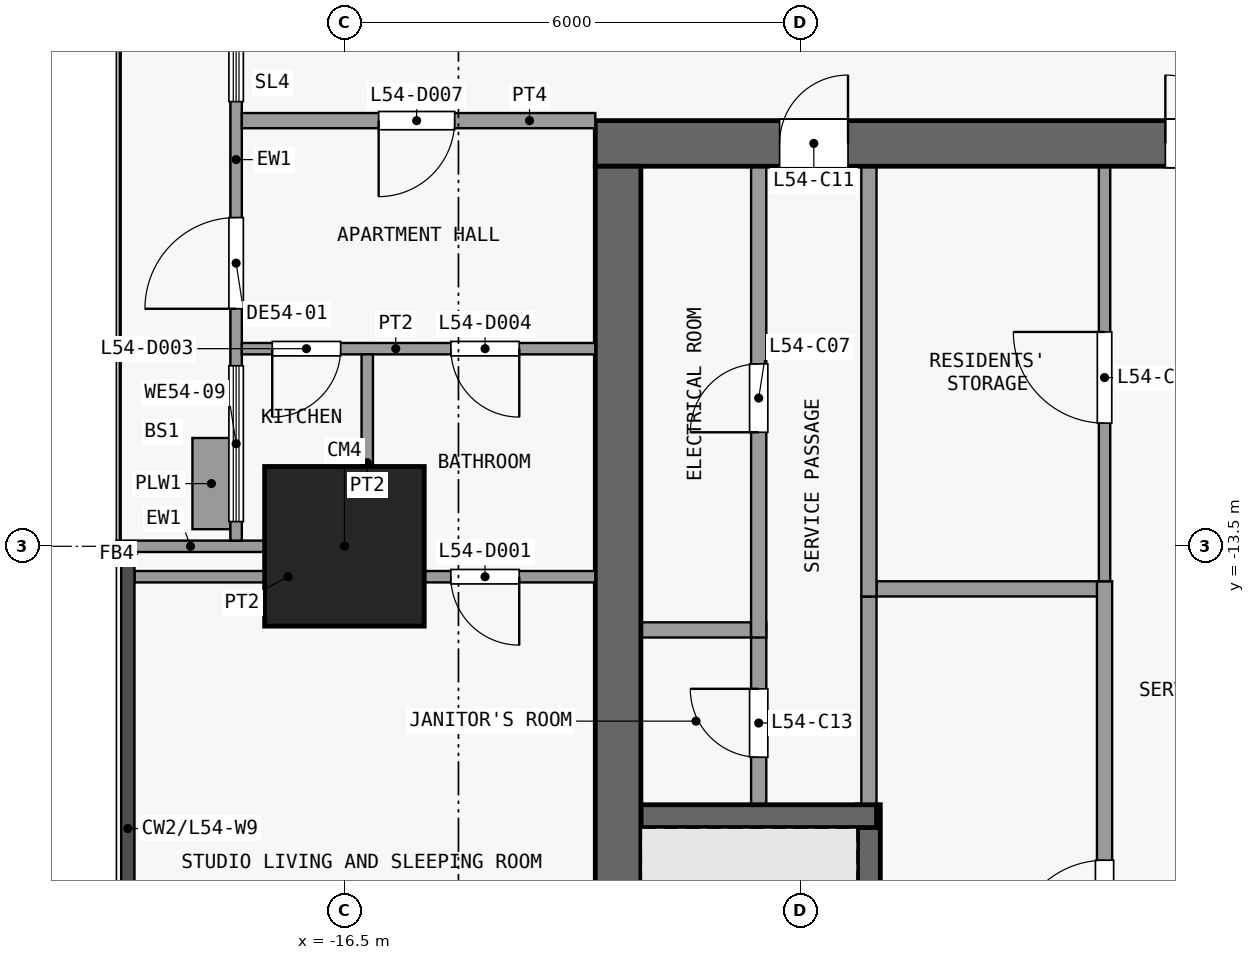
"""IFC4 building model, lengths in metres.
Left out: names, types, materials, properties, quantities, classifications, styles, units other than length and angle.
Written with IfcOpenShell. Run it as: python <this file> out.ifc"""

import sys

from ifc_helpers import new_model, si_unit, direction, frame, frame_2d, origin, origin_2d, place, context, subcontext, project, spatial, rectangle, extrude, element, fill, save


model = new_model("IFC4")
c1 = context("Model", 3, precision=1e-05, world=origin(), true_north=direction((0.0, 1.0)))
c2 = subcontext(c1, "Body", "Model", "MODEL_VIEW")
j1 = project(units=[si_unit("LENGTHUNIT", "METRE"), si_unit("PLANEANGLEUNIT", "RADIAN")], contexts=[c1])
p1 = place(None, origin())
s1 = spatial("IfcSite", under=j1, at=p1, CompositionType="ELEMENT")
p2 = place(p1, origin())
s2 = spatial("IfcBuilding", under=s1, at=p2, CompositionType="ELEMENT")
p3 = place(p2, frame((0.0, 0.0, 215.9)))
s3 = spatial("IfcBuildingStorey", under=s2, at=p3, CompositionType="ELEMENT", Elevation=215.9)
p4 = place(p3, frame((-16.5, -13.5, 0.0), z_axis=(0.0, 0.0, 1.0), x_axis=(1.0, 0.0, 0.0)))
e1 = element("IfcColumn", 1, at=p4, inside=s3, PredefinedType="COLUMN", context=c2, shape_type="SweptSolid", body=[
    extrude(rectangle(XDim=2.1, YDim=2.1, at=origin_2d()), origin(), (0.0, 0.0, 1.0), 3.6),
])
p5 = place(p3, frame((-13.2, -8.2, 0.0), z_axis=(0.0, 0.0, 1.0), x_axis=(1.0, 0.0, 0.0)))
e2 = element("IfcWall", 2, at=p5, inside=s3, PredefinedType="SHEAR", context=c2, shape_type="SweptSolid", body=[
    extrude(rectangle(XDim=26.4, YDim=0.6, at=frame_2d((13.2, 0.0))), origin(), (0.0, 0.0, 1.0), 3.3),
])
p6 = place(p5, frame((7.5, 0.0, 0.0)))
e3 = element("IfcOpeningElement", 3, at=p6, cuts=e2, PredefinedType="OPENING", context=c2, shape_type="SweptSolid", body=[
    extrude(rectangle(XDim=1.8, YDim=2.1, at=frame_2d((0.9, 1.05))), frame((0.0, 0.31, 0.0), z_axis=(0.0, -1.0, 0.0), x_axis=(1.0, 0.0, 0.0)), (0.0, 0.0, 1.0), 0.62),
])
p7 = place(p5, frame((17.1, 0.0, 0.0)))
e4 = element("IfcOpeningElement", 4, at=p7, cuts=e2, PredefinedType="OPENING", context=c2, shape_type="SweptSolid", body=[
    extrude(rectangle(XDim=1.8, YDim=2.1, at=frame_2d((0.9, 1.05))), frame((0.0, 0.31, 0.0), z_axis=(0.0, -1.0, 0.0), x_axis=(1.0, 0.0, 0.0)), (0.0, 0.0, 1.0), 0.62),
])
p8 = place(p5, frame((2.425, 0.0, 0.0)))
e5 = element("IfcOpeningElement", 5, at=p8, cuts=e2, PredefinedType="OPENING", context=c2, shape_type="SweptSolid", body=[
    extrude(rectangle(XDim=0.9, YDim=2.1, at=frame_2d((0.45, 1.05))), frame((0.0, 0.31, 0.0), z_axis=(0.0, -1.0, 0.0), x_axis=(1.0, 0.0, 0.0)), (0.0, 0.0, 1.0), 0.62),
])
p9 = place(p5, frame((23.075, 0.0, 0.0)))
e6 = element("IfcOpeningElement", 6, at=p9, cuts=e2, PredefinedType="OPENING", context=c2, shape_type="SweptSolid", body=[
    extrude(rectangle(XDim=0.9, YDim=2.1, at=frame_2d((0.45, 1.05))), frame((0.0, 0.31, 0.0), z_axis=(0.0, -1.0, 0.0), x_axis=(1.0, 0.0, 0.0)), (0.0, 0.0, 1.0), 0.62),
])
p10 = place(p3, frame((-12.9, -24.6, 0.0), z_axis=(0.0, 0.0, 1.0), x_axis=(0.0, 1.0, 0.0)))
e7 = element("IfcWall", 7, at=p10, inside=s3, PredefinedType="SHEAR", context=c2, shape_type="SweptSolid", body=[
    extrude(rectangle(XDim=16.1, YDim=0.6, at=frame_2d((8.05, 0.0))), origin(), (0.0, 0.0, 1.0), 3.3),
])
p11 = place(p3, frame((-12.6, -17.05, 0.0), z_axis=(0.0, 0.0, 1.0), x_axis=(1.0, 0.0, 0.0)))
e8 = element("IfcWall", 8, at=p11, inside=s3, PredefinedType="SHEAR", context=c2, shape_type="SweptSolid", body=[
    extrude(rectangle(XDim=3.1, YDim=0.3, at=frame_2d((1.55, 0.0))), origin(), (0.0, 0.0, 1.0), 3.3),
])
p12 = place(p3, frame((-12.6, -14.6, 0.0), z_axis=(0.0, 0.0, 1.0), x_axis=(1.0, 0.0, 0.0)))
e9 = element("IfcWall", 9, at=p12, inside=s3, PredefinedType="PARTITIONING", context=c2, shape_type="SweptSolid", body=[
    extrude(rectangle(XDim=1.45, YDim=0.2, at=frame_2d((0.725, 0.0))), origin(), (0.0, 0.0, 1.0), 3.3),
])
p13 = place(p3, frame((-9.5, -14.06, 0.0), z_axis=(0.0, 0.0, 1.0), x_axis=(1.0, 0.0, 0.0)))
e10 = element("IfcWall", 10, at=p13, inside=s3, PredefinedType="PARTITIONING", context=c2, shape_type="SweptSolid", body=[
    extrude(rectangle(XDim=3.075, YDim=0.2, at=frame_2d((1.538, 0.0))), origin(), (0.0, 0.0, 1.0), 3.3),
])
p14 = place(p3, frame((-11.05, -16.9, 0.0), z_axis=(0.0, 0.0, 1.0), x_axis=(0.0, 1.0, 0.0)))
e11 = element("IfcWall", 11, at=p14, inside=s3, PredefinedType="PARTITIONING", context=c2, shape_type="SweptSolid", body=[
    extrude(rectangle(XDim=2.4, YDim=0.2, at=frame_2d((1.2, 0.0))), origin(), (0.0, 0.0, 1.0), 3.3),
])
p15 = place(p14, frame((0.625, 0.0, 0.0)))
e12 = element("IfcOpeningElement", 12, at=p15, cuts=e11, PredefinedType="OPENING", context=c2, shape_type="SweptSolid", body=[
    extrude(rectangle(XDim=0.9, YDim=2.1, at=frame_2d((0.45, 1.05))), frame((0.0, 0.11, 0.0), z_axis=(0.0, -1.0, 0.0), x_axis=(1.0, 0.0, 0.0)), (0.0, 0.0, 1.0), 0.22),
])
p16 = place(p3, frame((-11.05, -14.7, 0.0), z_axis=(0.0, 0.0, 1.0), x_axis=(0.0, 1.0, 0.0)))
e13 = element("IfcWall", 13, at=p16, inside=s3, PredefinedType="PARTITIONING", context=c2, shape_type="SweptSolid", body=[
    extrude(rectangle(XDim=6.2, YDim=0.2, at=frame_2d((3.1, 0.0))), origin(), (0.0, 0.0, 1.0), 3.3),
])
p17 = place(p16, frame((2.7, 0.0, 0.0)))
e14 = element("IfcOpeningElement", 14, at=p17, cuts=e13, PredefinedType="OPENING", context=c2, shape_type="SweptSolid", body=[
    extrude(rectangle(XDim=0.9, YDim=2.1, at=frame_2d((0.45, 1.05))), frame((0.0, 0.11, 0.0), z_axis=(0.0, -1.0, 0.0), x_axis=(1.0, 0.0, 0.0)), (0.0, 0.0, 1.0), 0.22),
])
p18 = place(p3, frame((-9.6, -24.6, 0.0), z_axis=(0.0, 0.0, 1.0), x_axis=(0.0, 1.0, 0.0)))
e15 = element("IfcWall", 15, at=p18, inside=s3, PredefinedType="SHEAR", context=c2, shape_type="SweptSolid", body=[
    extrude(rectangle(XDim=7.7, YDim=0.3, at=frame_2d((3.85, 0.0))), origin(), (0.0, 0.0, 1.0), 3.3),
])
p19 = place(p18, frame((0.1, 0.0, 0.0)))
e16 = element("IfcOpeningElement", 16, at=p19, cuts=e15, PredefinedType="OPENING", context=c2, shape_type="SweptSolid", body=[
    extrude(rectangle(XDim=1.1, YDim=2.1, at=frame_2d((0.55, 1.05))), frame((0.0, 0.16, 0.0), z_axis=(0.0, -1.0, 0.0), x_axis=(1.0, 0.0, 0.0)), (0.0, 0.0, 1.0), 0.32),
])
p20 = place(p3, frame((-9.6, -16.9, 0.0), z_axis=(0.0, 0.0, 1.0), x_axis=(0.0, 1.0, 0.0)))
e17 = element("IfcWall", 17, at=p20, inside=s3, PredefinedType="PARTITIONING", context=c2, shape_type="SweptSolid", body=[
    extrude(rectangle(XDim=2.74, YDim=0.2, at=frame_2d((1.37, 0.0))), origin(), (0.0, 0.0, 1.0), 3.3),
])
p21 = place(p3, frame((-9.6, -14.16, 0.0), z_axis=(0.0, 0.0, 1.0), x_axis=(0.0, 1.0, 0.0)))
e18 = element("IfcWall", 18, at=p21, inside=s3, PredefinedType="PARTITIONING", context=c2, shape_type="SweptSolid", body=[
    extrude(rectangle(XDim=5.66, YDim=0.2, at=frame_2d((2.83, 0.0))), origin(), (0.0, 0.0, 1.0), 3.3),
])
p22 = place(p3, frame((-6.5, -22.5, 0.0), z_axis=(0.0, 0.0, 1.0), x_axis=(0.0, 1.0, 0.0)))
e19 = element("IfcWall", 19, at=p22, inside=s3, PredefinedType="PARTITIONING", context=c2, shape_type="SweptSolid", body=[
    extrude(rectangle(XDim=8.54, YDim=0.2, at=frame_2d((4.27, 0.0))), origin(), (0.0, 0.0, 1.0), 3.3),
])
p23 = place(p22, frame((3.67, 0.0, 0.0)))
e20 = element("IfcOpeningElement", 20, at=p23, cuts=e19, PredefinedType="OPENING", context=c2, shape_type="SweptSolid", body=[
    extrude(rectangle(XDim=1.2, YDim=2.1, at=frame_2d((0.6, 1.05))), frame((0.0, 0.11, 0.0), z_axis=(0.0, -1.0, 0.0), x_axis=(1.0, 0.0, 0.0)), (0.0, 0.0, 1.0), 0.22),
])
p24 = place(p3, frame((-6.5, -13.96, 0.0), z_axis=(0.0, 0.0, 1.0), x_axis=(0.0, 1.0, 0.0)))
e21 = element("IfcWall", 21, at=p24, inside=s3, PredefinedType="PARTITIONING", context=c2, shape_type="SweptSolid", body=[
    extrude(rectangle(XDim=5.46, YDim=0.15, at=frame_2d((2.73, 0.0))), origin(), (0.0, 0.0, 1.0), 3.3),
])
p25 = place(p24, frame((2.08, 0.0, 0.0)))
e22 = element("IfcOpeningElement", 22, at=p25, cuts=e21, PredefinedType="OPENING", context=c2, shape_type="SweptSolid", body=[
    extrude(rectangle(XDim=1.2, YDim=2.1, at=frame_2d((0.6, 1.05))), frame((0.0, 0.085, 0.0), z_axis=(0.0, -1.0, 0.0), x_axis=(1.0, 0.0, 0.0)), (0.0, 0.0, 1.0), 0.17),
])
p26 = place(p3, frame((-17.55, -13.5, 0.0), z_axis=(0.0, 0.0, 1.0), x_axis=(-1.0, 0.0, 0.0)))
e23 = element("IfcWall", 23, at=p26, inside=s3, PredefinedType="SOLIDWALL", context=c2, shape_type="SweptSolid", body=[
    extrude(rectangle(XDim=1.95, YDim=0.15, at=frame_2d((0.975, 0.0))), origin(), (0.0, 0.0, 1.0), 3.3),
])
p27 = place(p3, frame((-17.925, -13.425, 0.0), z_axis=(0.0, 0.0, 1.0), x_axis=(0.0, 1.0, 0.0)))
e24 = element("IfcWall", 24, at=p27, inside=s3, PredefinedType="SOLIDWALL", context=c2, shape_type="SweptSolid", body=[
    extrude(rectangle(XDim=8.85, YDim=0.15, at=frame_2d((4.425, 0.0))), origin(), (0.0, 0.0, 1.0), 3.3),
])
p28 = place(p27, frame((3.05, 0.0, 0.0)))
e25 = element("IfcOpeningElement", 25, at=p28, cuts=e24, PredefinedType="OPENING", context=c2, shape_type="SweptSolid", body=[
    extrude(rectangle(XDim=1.2, YDim=2.4, at=frame_2d((0.6, 1.2))), frame((0.0, 0.085, 0.0), z_axis=(0.0, -1.0, 0.0), x_axis=(1.0, 0.0, 0.0)), (0.0, 0.0, 1.0), 0.17),
])
p29 = place(p27, frame((0.25, 0.0, 0.9)))
e26 = element("IfcOpeningElement", 26, at=p29, cuts=e24, PredefinedType="OPENING", context=c2, shape_type="SweptSolid", body=[
    extrude(rectangle(XDim=2.05, YDim=2.1, at=frame_2d((1.025, 1.05))), frame((0.0, 0.085, 0.0), z_axis=(0.0, -1.0, 0.0), x_axis=(1.0, 0.0, 0.0)), (0.0, 0.0, 1.0), 0.17),
])
p30 = place(p27, frame((5.775, 0.0, 0.9)))
e27 = element("IfcOpeningElement", 27, at=p30, cuts=e24, PredefinedType="OPENING", context=c2, shape_type="SweptSolid", body=[
    extrude(rectangle(XDim=2.275, YDim=2.1, at=frame_2d((1.137, 1.05))), frame((0.0, 0.085, 0.0), z_axis=(0.0, -1.0, 0.0), x_axis=(1.0, 0.0, 0.0)), (0.0, 0.0, 1.0), 0.17),
])
p31 = place(p3, frame((-18.25, -13.275, 0.0), z_axis=(0.0, 0.0, 1.0), x_axis=(0.0, 1.0, 0.0)))
e28 = element("IfcWall", 28, at=p31, inside=s3, PredefinedType="USERDEFINED", context=c2, shape_type="SweptSolid", body=[
    extrude(rectangle(XDim=1.2, YDim=0.5, at=frame_2d((0.6, 0.0))), origin(), (0.0, 0.0, 1.0), 0.9),
])
p32 = place(p3, frame((-19.262, -13.9, 0.0), z_axis=(0.0, 0.0, 1.0), x_axis=(1.0, 0.0, 0.0)))
e29 = element("IfcWall", 29, at=p32, inside=s3, PredefinedType="PARTITIONING", context=c2, shape_type="SweptSolid", body=[
    extrude(rectangle(XDim=6.062, YDim=0.15, at=frame_2d((3.031, 0.0))), origin(), (0.0, 0.0, 1.0), 3.3),
])
p33 = place(p32, frame((4.162, 0.0, 0.0)))
e30 = element("IfcOpeningElement", 30, at=p33, cuts=e29, PredefinedType="OPENING", context=c2, shape_type="SweptSolid", body=[
    extrude(rectangle(XDim=0.9, YDim=2.1, at=frame_2d((0.45, 1.05))), frame((0.0, 0.085, 0.0), z_axis=(0.0, -1.0, 0.0), x_axis=(1.0, 0.0, 0.0)), (0.0, 0.0, 1.0), 0.17),
])
p34 = place(p3, frame((-17.85, -10.9, 0.0), z_axis=(0.0, 0.0, 1.0), x_axis=(1.0, 0.0, 0.0)))
e31 = element("IfcWall", 31, at=p34, inside=s3, PredefinedType="PARTITIONING", context=c2, shape_type="SweptSolid", body=[
    extrude(rectangle(XDim=4.65, YDim=0.15, at=frame_2d((2.325, 0.0))), origin(), (0.0, 0.0, 1.0), 3.3),
])
p35 = place(p34, frame((0.4, 0.0, 0.0)))
e32 = element("IfcOpeningElement", 32, at=p35, cuts=e31, PredefinedType="OPENING", context=c2, shape_type="SweptSolid", body=[
    extrude(rectangle(XDim=0.9, YDim=2.1, at=frame_2d((0.45, 1.05))), frame((0.0, 0.085, 0.0), z_axis=(0.0, -1.0, 0.0), x_axis=(1.0, 0.0, 0.0)), (0.0, 0.0, 1.0), 0.17),
])
p36 = place(p34, frame((2.75, 0.0, 0.0)))
e33 = element("IfcOpeningElement", 33, at=p36, cuts=e31, PredefinedType="OPENING", context=c2, shape_type="SweptSolid", body=[
    extrude(rectangle(XDim=0.9, YDim=2.1, at=frame_2d((0.45, 1.05))), frame((0.0, 0.085, 0.0), z_axis=(0.0, -1.0, 0.0), x_axis=(1.0, 0.0, 0.0)), (0.0, 0.0, 1.0), 0.17),
])
p37 = place(p3, frame((-17.85, -7.9, 0.0), z_axis=(0.0, 0.0, 1.0), x_axis=(1.0, 0.0, 0.0)))
e34 = element("IfcWall", 34, at=p37, inside=s3, PredefinedType="PARTITIONING", context=c2, shape_type="SweptSolid", body=[
    extrude(rectangle(XDim=4.65, YDim=0.2, at=frame_2d((2.325, 0.0))), origin(), (0.0, 0.0, 1.0), 3.3),
])
p38 = place(p37, frame((1.8, 0.0, 0.0)))
e35 = element("IfcOpeningElement", 35, at=p38, cuts=e34, PredefinedType="OPENING", context=c2, shape_type="SweptSolid", body=[
    extrude(rectangle(XDim=1.0, YDim=2.1, at=frame_2d((0.5, 1.05))), frame((0.0, 0.11, 0.0), z_axis=(0.0, -1.0, 0.0), x_axis=(1.0, 0.0, 0.0)), (0.0, 0.0, 1.0), 0.22),
])
p39 = place(p3, frame((-16.2, -13.825, 0.0), z_axis=(0.0, 0.0, 1.0), x_axis=(0.0, 1.0, 0.0)))
e36 = element("IfcWall", 36, at=p39, inside=s3, PredefinedType="PARTITIONING", context=c2, shape_type="SweptSolid", body=[
    extrude(rectangle(XDim=2.85, YDim=0.15, at=frame_2d((1.425, 0.0))), origin(), (0.0, 0.0, 1.0), 3.3),
])
p40 = place(p6, origin())
e37 = element("IfcDoor", 37, at=p40, inside=s3, OperationType="DOUBLE_DOOR_SINGLE_SWING", PredefinedType="DOOR", context=c2, shape_type="SweptSolid", body=[
    extrude(rectangle(XDim=1.8, YDim=2.1, at=frame_2d((0.9, 1.05))), frame((0.0, 0.025, 0.0), z_axis=(0.0, -1.0, 0.0), x_axis=(1.0, 0.0, 0.0)), (0.0, 0.0, 1.0), 0.05),
])
fill(e3, e37)
p41 = place(p17, origin())
e38 = element("IfcDoor", 38, at=p41, inside=s3, OperationType="SINGLE_SWING_LEFT", PredefinedType="DOOR", context=c2, shape_type="SweptSolid", body=[
    extrude(rectangle(XDim=0.9, YDim=2.1, at=frame_2d((0.45, 1.05))), frame((0.0, 0.025, 0.0), z_axis=(0.0, -1.0, 0.0), x_axis=(1.0, 0.0, 0.0)), (0.0, 0.0, 1.0), 0.05),
])
fill(e14, e38)
p42 = place(p23, origin())
e39 = element("IfcDoor", 39, at=p42, inside=s3, OperationType="SINGLE_SWING_LEFT", PredefinedType="DOOR", context=c2, shape_type="SweptSolid", body=[
    extrude(rectangle(XDim=1.2, YDim=2.1, at=frame_2d((0.6, 1.05))), frame((0.0, 0.025, 0.0), z_axis=(0.0, -1.0, 0.0), x_axis=(1.0, 0.0, 0.0)), (0.0, 0.0, 1.0), 0.05),
])
fill(e20, e39)
p43 = place(p8, origin())
e40 = element("IfcDoor", 40, at=p43, inside=s3, OperationType="SINGLE_SWING_RIGHT", PredefinedType="DOOR", context=c2, shape_type="SweptSolid", body=[
    extrude(rectangle(XDim=0.9, YDim=2.1, at=frame_2d((0.45, 1.05))), frame((0.0, 0.025, 0.0), z_axis=(0.0, -1.0, 0.0), x_axis=(1.0, 0.0, 0.0)), (0.0, 0.0, 1.0), 0.05),
])
fill(e5, e40)
p44 = place(p15, origin())
e41 = element("IfcDoor", 41, at=p44, inside=s3, OperationType="SINGLE_SWING_RIGHT", PredefinedType="DOOR", context=c2, shape_type="SweptSolid", body=[
    extrude(rectangle(XDim=0.9, YDim=2.1, at=frame_2d((0.45, 1.05))), frame((0.0, 0.025, 0.0), z_axis=(0.0, -1.0, 0.0), x_axis=(1.0, 0.0, 0.0)), (0.0, 0.0, 1.0), 0.05),
])
fill(e12, e41)
p45 = place(p25, origin())
e42 = element("IfcDoor", 42, at=p45, inside=s3, OperationType="SINGLE_SWING_RIGHT", PredefinedType="DOOR", context=c2, shape_type="SweptSolid", body=[
    extrude(rectangle(XDim=1.2, YDim=2.1, at=frame_2d((0.6, 1.05))), frame((0.0, 0.025, 0.0), z_axis=(0.0, -1.0, 0.0), x_axis=(1.0, 0.0, 0.0)), (0.0, 0.0, 1.0), 0.05),
])
fill(e22, e42)
p46 = place(p28, origin())
e43 = element("IfcDoor", 43, at=p46, inside=s3, OperationType="SINGLE_SWING_LEFT", PredefinedType="DOOR", context=c2, shape_type="SweptSolid", body=[
    extrude(rectangle(XDim=1.2, YDim=2.4, at=frame_2d((0.6, 1.2))), frame((0.0, 0.025, 0.0), z_axis=(0.0, -1.0, 0.0), x_axis=(1.0, 0.0, 0.0)), (0.0, 0.0, 1.0), 0.05),
])
fill(e25, e43)
p47 = place(p29, origin())
e44 = element("IfcWindow", 44, at=p47, inside=s3, PartitioningType="SINGLE_PANEL", PredefinedType="WINDOW", context=c2, shape_type="SweptSolid", body=[
    extrude(rectangle(XDim=2.05, YDim=2.1, at=frame_2d((1.025, 1.05))), frame((0.0, 0.03, 0.0), z_axis=(0.0, -1.0, 0.0), x_axis=(1.0, 0.0, 0.0)), (0.0, 0.0, 1.0), 0.06),
])
fill(e26, e44)
p48 = place(p30, origin())
e45 = element("IfcWindow", 45, at=p48, inside=s3, PartitioningType="SINGLE_PANEL", PredefinedType="WINDOW", context=c2, shape_type="SweptSolid", body=[
    extrude(rectangle(XDim=2.275, YDim=2.1, at=frame_2d((1.137, 1.05))), frame((0.0, 0.03, 0.0), z_axis=(0.0, -1.0, 0.0), x_axis=(1.0, 0.0, 0.0)), (0.0, 0.0, 1.0), 0.06),
])
fill(e27, e45)
p49 = place(p33, origin())
e46 = element("IfcDoor", 46, at=p49, inside=s3, OperationType="SINGLE_SWING_RIGHT", PredefinedType="DOOR", context=c2, shape_type="SweptSolid", body=[
    extrude(rectangle(XDim=0.9, YDim=2.1, at=frame_2d((0.45, 1.05))), frame((0.0, 0.025, 0.0), z_axis=(0.0, -1.0, 0.0), x_axis=(1.0, 0.0, 0.0)), (0.0, 0.0, 1.0), 0.05),
])
fill(e30, e46)
p50 = place(p35, origin())
e47 = element("IfcDoor", 47, at=p50, inside=s3, OperationType="SINGLE_SWING_LEFT", PredefinedType="DOOR", context=c2, shape_type="SweptSolid", body=[
    extrude(rectangle(XDim=0.9, YDim=2.1, at=frame_2d((0.45, 1.05))), frame((0.0, 0.025, 0.0), z_axis=(0.0, -1.0, 0.0), x_axis=(1.0, 0.0, 0.0)), (0.0, 0.0, 1.0), 0.05),
])
fill(e32, e47)
p51 = place(p36, origin())
e48 = element("IfcDoor", 48, at=p51, inside=s3, OperationType="SINGLE_SWING_RIGHT", PredefinedType="DOOR", context=c2, shape_type="SweptSolid", body=[
    extrude(rectangle(XDim=0.9, YDim=2.1, at=frame_2d((0.45, 1.05))), frame((0.0, 0.025, 0.0), z_axis=(0.0, -1.0, 0.0), x_axis=(1.0, 0.0, 0.0)), (0.0, 0.0, 1.0), 0.05),
])
fill(e33, e48)
p52 = place(p38, origin())
e49 = element("IfcDoor", 49, at=p52, inside=s3, OperationType="SINGLE_SWING_LEFT", PredefinedType="DOOR", context=c2, shape_type="SweptSolid", body=[
    extrude(rectangle(XDim=1.0, YDim=2.1, at=frame_2d((0.5, 1.05))), frame((0.0, 0.025, 0.0), z_axis=(0.0, -1.0, 0.0), x_axis=(1.0, 0.0, 0.0)), (0.0, 0.0, 1.0), 0.05),
])
fill(e35, e49)
save(model, sys.argv[1])
